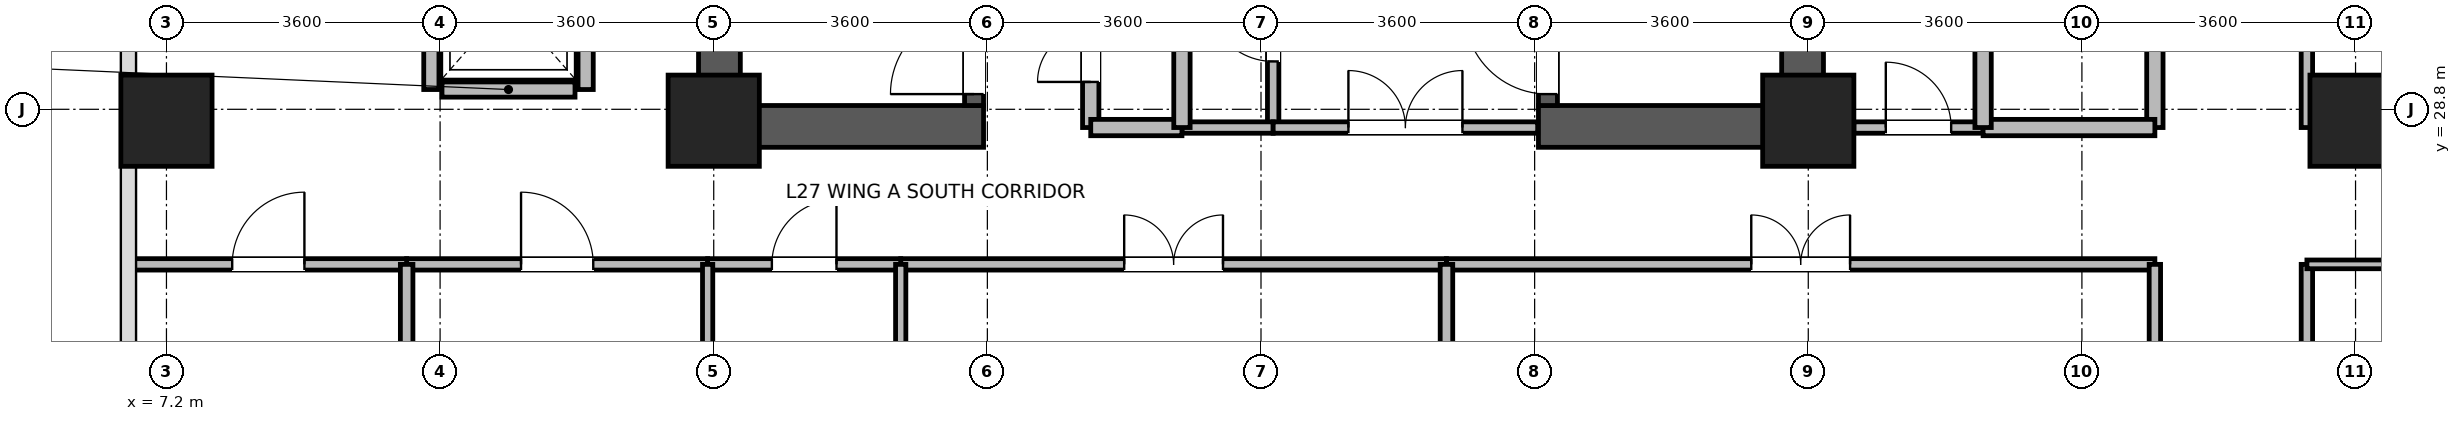
"""IFC4 building model, lengths in metres.
Left out: names, types, materials, properties, quantities, classifications, styles, units other than length and angle.
Written with IfcOpenShell. Run it as: python <this file> out.ifc"""

import sys

from ifc_helpers import new_model, si_unit, direction, frame, frame_2d, origin, origin_2d, place, context, subcontext, project, spatial, rectangle, extrude, source, transform, mapped, element, fill, save


model = new_model("IFC4")
c1 = context("Model", 3, precision=1e-05, world=origin(), true_north=direction((0.0, 1.0)))
c2 = subcontext(c1, "Body", "Model", "MODEL_VIEW")
j1 = project(units=[si_unit("LENGTHUNIT", "METRE"), si_unit("PLANEANGLEUNIT", "RADIAN")], contexts=[c1])
p1 = place(None, origin())
s1 = spatial("IfcSite", under=j1, at=p1, CompositionType="ELEMENT")
p2 = place(p1, origin())
s2 = spatial("IfcBuilding", under=s1, at=p2, CompositionType="ELEMENT")
p3 = place(p2, frame((0.0, 0.0, 108.2)))
s3 = spatial("IfcBuildingStorey", under=s2, at=p3, CompositionType="ELEMENT", Elevation=108.2)
for number, where, z_axis, x_axis in (
    (1, (14.475, 28.3, 0.0), (0.0, 0.0, 1.0), (0.0, 1.0, 0.0)),
    (2, (28.725, 28.3, 0.0), (0.0, 0.0, 1.0), (0.0, 1.0, 0.0)),
):
    element("IfcWall", number, at=place(p3, frame(where, z_axis=z_axis, x_axis=x_axis)), inside=s3, PredefinedType="SHEAR", context=c2, shape_type="SweptSolid", body=[
        extrude(rectangle(XDim=8.1, YDim=0.55, at=frame_2d((4.05, 0.0))), origin(), (0.0, 0.0, 1.0), 3.45),
    ])
for number, where, z_axis, x_axis in (
    (3, (14.75, 28.575, 0.0), (0.0, 0.0, 1.0), (1.0, 0.0, 0.0)),
    (4, (25.25, 28.575, 0.0), (0.0, 0.0, 1.0), (1.0, 0.0, 0.0)),
):
    element("IfcWall", number, at=place(p3, frame(where, z_axis=z_axis, x_axis=x_axis)), inside=s3, PredefinedType="SHEAR", context=c2, shape_type="SweptSolid", body=[
        extrude(rectangle(XDim=3.2, YDim=0.55, at=frame_2d((1.6, 0.0))), origin(), (0.0, 0.0, 1.0), 3.45),
    ])
p4 = place(p3, frame((17.825, 28.85, 0.0), z_axis=(0.0, 0.0, 1.0), x_axis=(0.0, 1.0, 0.0)))
e5 = element("IfcWall", 5, at=p4, inside=s3, PredefinedType="SHEAR", context=c2, shape_type="SweptSolid", body=[
    extrude(rectangle(XDim=7.0, YDim=0.25, at=frame_2d((3.5, 0.0))), origin(), (0.0, 0.0, 1.0), 3.45),
])
p5 = place(p4, frame((0.15, 0.0, 0.0)))
e6 = element("IfcOpeningElement", 6, at=p5, cuts=e5, PredefinedType="OPENING", context=c2, shape_type="SweptSolid", body=[
    extrude(rectangle(XDim=1.1, YDim=2.08, at=frame_2d((0.55, 1.04))), frame((0.0, 0.135, 0.0), z_axis=(0.0, -1.0, 0.0), x_axis=(1.0, 0.0, 0.0)), (0.0, 0.0, 1.0), 0.27),
])
p6 = place(p3, frame((25.375, 28.85, 0.0), z_axis=(0.0, 0.0, 1.0), x_axis=(0.0, 1.0, 0.0)))
e7 = element("IfcWall", 7, at=p6, inside=s3, PredefinedType="SHEAR", context=c2, shape_type="SweptSolid", body=[
    extrude(rectangle(XDim=7.0, YDim=0.25, at=frame_2d((3.5, 0.0))), origin(), (0.0, 0.0, 1.0), 3.45),
])
p7 = place(p6, frame((0.15, 0.0, 0.0)))
e8 = element("IfcOpeningElement", 8, at=p7, cuts=e7, PredefinedType="OPENING", context=c2, shape_type="SweptSolid", body=[
    extrude(rectangle(XDim=1.1, YDim=2.08, at=frame_2d((0.55, 1.04))), frame((0.0, 0.135, 0.0), z_axis=(0.0, -1.0, 0.0), x_axis=(1.0, 0.0, 0.0)), (0.0, 0.0, 1.0), 0.27),
])
m1 = source(origin(), c2, "Body", "SweptSolid", [
    extrude(rectangle(XDim=1.2, YDim=1.2, at=origin_2d()), origin(), (0.0, 0.0, 1.0), 3.7),
])
for number, where, z_axis, x_axis in (
    (9, (7.2, 28.65, 0.0), (0.0, 0.0, 1.0), (1.0, 0.0, 0.0)),
    (10, (14.4, 28.65, 0.0), (0.0, 0.0, 1.0), (1.0, 0.0, 0.0)),
    (11, (28.8, 28.65, 0.0), (0.0, 0.0, 1.0), (1.0, 0.0, 0.0)),
    (12, (36.0, 28.65, 0.0), (0.0, 0.0, 1.0), (1.0, 0.0, 0.0)),
):
    element("IfcColumn", number, at=place(p3, frame(where, z_axis=z_axis, x_axis=x_axis)), inside=s3, PredefinedType="COLUMN", context=c2, shape_type="MappedRepresentation", body=[
        mapped(m1, transform((0.0, 0.0, 0.0), x_axis=(1.0, 0.0, 0.0), y_axis=(0.0, 1.0, 0.0), z_axis=(0.0, 0.0, 1.0), scale=1.0)),
    ])
p8 = place(p3, frame((10.825, 29.06, 0.0), z_axis=(0.0, 0.0, 1.0), x_axis=(1.0, 0.0, 0.0)))
e13 = element("IfcWall", 13, at=p8, inside=s3, PredefinedType="PARTITIONING", context=c2, shape_type="SweptSolid", body=[
    extrude(rectangle(XDim=1.75, YDim=0.2, at=frame_2d((0.875, 0.0))), origin(), (0.0, 0.0, 1.0), 3.43),
])
for number, where, z_axis, x_axis in (
    (14, (10.685, 29.06, 0.0), (0.0, 0.0, 1.0), (0.0, 1.0, 0.0)),
    (15, (12.715, 29.06, 0.0), (0.0, 0.0, 1.0), (0.0, 1.0, 0.0)),
):
    element("IfcWall", number, at=place(p3, frame(where, z_axis=z_axis, x_axis=x_axis)), inside=s3, PredefinedType="PARTITIONING", context=c2, shape_type="SweptSolid", body=[
        extrude(rectangle(XDim=2.28, YDim=0.2, at=frame_2d((1.14, 0.0))), origin(), (0.0, 0.0, 1.0), 3.43),
    ])
p9 = place(p3, frame((35.36, 16.96, 0.0), z_axis=(0.0, 0.0, 1.0), x_axis=(0.0, 1.0, 0.0)))
e16 = element("IfcWall", 16, at=p9, inside=s3, PredefinedType="PARTITIONING", context=c2, shape_type="SweptSolid", body=[
    extrude(rectangle(XDim=9.8, YDim=0.15, at=frame_2d((4.9, 0.0))), origin(), (0.0, 0.0, 1.0), 3.43),
])
p10 = place(p9, frame((2.486, 0.0, 0.0)))
e17 = element("IfcOpeningElement", 17, at=p10, cuts=e16, PredefinedType="OPENING", context=c2, shape_type="SweptSolid", body=[
    extrude(rectangle(XDim=1.3, YDim=2.12, at=frame_2d((0.65, 1.06))), frame((0.0, 0.085, 0.0), z_axis=(0.0, -1.0, 0.0), x_axis=(1.0, 0.0, 0.0)), (0.0, 0.0, 1.0), 0.17),
])
p11 = place(p3, frame((24.04, 26.76, 0.0), z_axis=(0.0, 0.0, 1.0), x_axis=(1.0, 0.0, 0.0)))
e18 = element("IfcWall", 18, at=p11, inside=s3, PredefinedType="PARTITIONING", context=c2, shape_type="SweptSolid", body=[
    extrude(rectangle(XDim=9.32, YDim=0.15, at=frame_2d((4.66, 0.0))), origin(), (0.0, 0.0, 1.0), 3.43),
])
p12 = place(p11, frame((4.01, 0.0, 0.0)))
e19 = element("IfcOpeningElement", 19, at=p12, cuts=e18, PredefinedType="OPENING", context=c2, shape_type="SweptSolid", body=[
    extrude(rectangle(XDim=1.3, YDim=2.12, at=frame_2d((0.65, 1.06))), frame((0.0, 0.085, 0.0), z_axis=(0.0, -1.0, 0.0), x_axis=(1.0, 0.0, 0.0)), (0.0, 0.0, 1.0), 0.17),
])
p13 = place(p3, frame((35.36, 28.56, 0.0), z_axis=(0.0, 0.0, 1.0), x_axis=(0.0, 1.0, 0.0)))
e20 = element("IfcWall", 20, at=p13, inside=s3, PredefinedType="PARTITIONING", context=c2, shape_type="SweptSolid", body=[
    extrude(rectangle(XDim=7.68, YDim=0.15, at=frame_2d((3.84, 0.0))), origin(), (0.0, 0.0, 1.0), 3.43),
])
p14 = place(p13, frame((3.19, 0.0, 0.0)))
e21 = element("IfcOpeningElement", 21, at=p14, cuts=e20, PredefinedType="OPENING", context=c2, shape_type="SweptSolid", body=[
    extrude(rectangle(XDim=1.3, YDim=2.12, at=frame_2d((0.65, 1.06))), frame((0.0, 0.085, 0.0), z_axis=(0.0, -1.0, 0.0), x_axis=(1.0, 0.0, 0.0)), (0.0, 0.0, 1.0), 0.17),
])
p15 = place(p3, frame((16.86, 26.76, 0.0), z_axis=(0.0, 0.0, 1.0), x_axis=(1.0, 0.0, 0.0)))
e22 = element("IfcWall", 22, at=p15, inside=s3, PredefinedType="PARTITIONING", context=c2, shape_type="SweptSolid", body=[
    extrude(rectangle(XDim=7.18, YDim=0.15, at=frame_2d((3.59, 0.0))), origin(), (0.0, 0.0, 1.0), 3.43),
])
p16 = place(p15, frame((2.94, 0.0, 0.0)))
e23 = element("IfcOpeningElement", 23, at=p16, cuts=e22, PredefinedType="OPENING", context=c2, shape_type="SweptSolid", body=[
    extrude(rectangle(XDim=1.3, YDim=2.12, at=frame_2d((0.65, 1.06))), frame((0.0, 0.085, 0.0), z_axis=(0.0, -1.0, 0.0), x_axis=(1.0, 0.0, 0.0)), (0.0, 0.0, 1.0), 0.17),
])
p17 = place(p3, frame((33.36, 21.6, 0.0), z_axis=(0.0, 0.0, 1.0), x_axis=(0.0, 1.0, 0.0)))
e24 = element("IfcWall", 24, at=p17, inside=s3, PredefinedType="PARTITIONING", context=c2, shape_type="SweptSolid", body=[
    extrude(rectangle(XDim=5.16, YDim=0.15, at=frame_2d((2.58, 0.0))), origin(), (0.0, 0.0, 1.0), 3.43),
])
p18 = place(p3, frame((10.36, 26.76, 0.0), z_axis=(0.0, 0.0, 1.0), x_axis=(1.0, 0.0, 0.0)))
e25 = element("IfcWall", 25, at=p18, inside=s3, PredefinedType="PARTITIONING", context=c2, shape_type="SweptSolid", body=[
    extrude(rectangle(XDim=3.96, YDim=0.15, at=frame_2d((1.98, 0.0))), origin(), (0.0, 0.0, 1.0), 3.43),
])
p19 = place(p18, frame((1.505, 0.0, 0.0)))
e26 = element("IfcOpeningElement", 26, at=p19, cuts=e25, PredefinedType="OPENING", context=c2, shape_type="SweptSolid", body=[
    extrude(rectangle(XDim=0.95, YDim=2.1, at=frame_2d((0.475, 1.05))), frame((0.0, 0.085, 0.0), z_axis=(0.0, -1.0, 0.0), x_axis=(1.0, 0.0, 0.0)), (0.0, 0.0, 1.0), 0.17),
])
p20 = place(p3, frame((33.36, 28.56, 0.0), z_axis=(0.0, 0.0, 1.0), x_axis=(0.0, 1.0, 0.0)))
e27 = element("IfcWall", 27, at=p20, inside=s3, PredefinedType="PARTITIONING", context=c2, shape_type="SweptSolid", body=[
    extrude(rectangle(XDim=3.84, YDim=0.215, at=frame_2d((1.92, 0.0))), origin(), (0.0, 0.0, 1.0), 3.43),
])
p21 = place(p20, frame((1.22, 0.0, 0.0)))
e28 = element("IfcOpeningElement", 28, at=p21, cuts=e27, PredefinedType="OPENING", context=c2, shape_type="SweptSolid", body=[
    extrude(rectangle(XDim=1.4, YDim=2.15, at=frame_2d((0.7, 1.075))), frame((0.0, 0.118, 0.0), z_axis=(0.0, -1.0, 0.0), x_axis=(1.0, 0.0, 0.0)), (0.0, 0.0, 1.0), 0.235),
])
p22 = place(p3, frame((6.72, 26.76, 0.0), z_axis=(0.0, 0.0, 1.0), x_axis=(1.0, 0.0, 0.0)))
e29 = element("IfcWall", 29, at=p22, inside=s3, PredefinedType="PARTITIONING", context=c2, shape_type="SweptSolid", body=[
    extrude(rectangle(XDim=3.64, YDim=0.15, at=frame_2d((1.82, 0.0))), origin(), (0.0, 0.0, 1.0), 3.43),
])
p23 = place(p22, frame((1.345, 0.0, 0.0)))
e30 = element("IfcOpeningElement", 30, at=p23, cuts=e29, PredefinedType="OPENING", context=c2, shape_type="SweptSolid", body=[
    extrude(rectangle(XDim=0.95, YDim=2.1, at=frame_2d((0.475, 1.05))), frame((0.0, 0.085, 0.0), z_axis=(0.0, -1.0, 0.0), x_axis=(1.0, 0.0, 0.0)), (0.0, 0.0, 1.0), 0.17),
])
p24 = place(p3, frame((19.36, 28.56, 0.0), z_axis=(0.0, 0.0, 1.0), x_axis=(0.0, 1.0, 0.0)))
e31 = element("IfcWall", 31, at=p24, inside=s3, PredefinedType="PARTITIONING", context=c2, shape_type="SweptSolid", body=[
    extrude(rectangle(XDim=2.6, YDim=0.215, at=frame_2d((1.3, 0.0))), origin(), (0.0, 0.0, 1.0), 3.43),
])
p25 = place(p24, frame((0.6, 0.0, 0.0)))
e32 = element("IfcOpeningElement", 32, at=p25, cuts=e31, PredefinedType="OPENING", context=c2, shape_type="SweptSolid", body=[
    extrude(rectangle(XDim=1.4, YDim=2.15, at=frame_2d((0.7, 1.075))), frame((0.0, 0.118, 0.0), z_axis=(0.0, -1.0, 0.0), x_axis=(1.0, 0.0, 0.0)), (0.0, 0.0, 1.0), 0.235),
])
p26 = place(p3, frame((21.76, 28.56, 0.0), z_axis=(0.0, 0.0, 1.0), x_axis=(0.0, 1.0, 0.0)))
e33 = element("IfcWall", 33, at=p26, inside=s3, PredefinedType="PARTITIONING", context=c2, shape_type="SweptSolid", body=[
    extrude(rectangle(XDim=2.6, YDim=0.15, at=frame_2d((1.3, 0.0))), origin(), (0.0, 0.0, 1.0), 3.43),
])
p27 = place(p26, frame((0.87, 0.0, 0.0)))
e34 = element("IfcOpeningElement", 34, at=p27, cuts=e33, PredefinedType="OPENING", context=c2, shape_type="SweptSolid", body=[
    extrude(rectangle(XDim=0.86, YDim=2.02, at=frame_2d((0.43, 1.01))), frame((0.0, 0.085, 0.0), z_axis=(0.0, -1.0, 0.0), x_axis=(1.0, 0.0, 0.0)), (0.0, 0.0, 1.0), 0.17),
])
p28 = place(p3, frame((14.32, 26.76, 0.0), z_axis=(0.0, 0.0, 1.0), x_axis=(1.0, 0.0, 0.0)))
e35 = element("IfcWall", 35, at=p28, inside=s3, PredefinedType="PARTITIONING", context=c2, shape_type="SweptSolid", body=[
    extrude(rectangle(XDim=2.54, YDim=0.15, at=frame_2d((1.27, 0.0))), origin(), (0.0, 0.0, 1.0), 3.43),
])
p29 = place(p28, frame((0.845, 0.0, 0.0)))
e36 = element("IfcOpeningElement", 36, at=p29, cuts=e35, PredefinedType="OPENING", context=c2, shape_type="SweptSolid", body=[
    extrude(rectangle(XDim=0.85, YDim=2.04, at=frame_2d((0.425, 1.02))), frame((0.0, 0.085, 0.0), z_axis=(0.0, -1.0, 0.0), x_axis=(1.0, 0.0, 0.0)), (0.0, 0.0, 1.0), 0.17),
])
p30 = place(p3, frame((29.4, 28.56, 0.0), z_axis=(0.0, 0.0, 1.0), x_axis=(1.0, 0.0, 0.0)))
e37 = element("IfcWall", 37, at=p30, inside=s3, PredefinedType="PARTITIONING", context=c2, shape_type="SweptSolid", body=[
    extrude(rectangle(XDim=1.7, YDim=0.15, at=frame_2d((0.85, 0.0))), origin(), (0.0, 0.0, 1.0), 2.78),
])
p31 = place(p30, frame((0.42, 0.0, 0.0)))
e38 = element("IfcOpeningElement", 38, at=p31, cuts=e37, PredefinedType="OPENING", context=c2, shape_type="SweptSolid", body=[
    extrude(rectangle(XDim=0.86, YDim=2.02, at=frame_2d((0.43, 1.01))), frame((0.0, 0.085, 0.0), z_axis=(0.0, -1.0, 0.0), x_axis=(1.0, 0.0, 0.0)), (0.0, 0.0, 1.0), 0.17),
])
p32 = place(p3, frame((31.1, 28.56, 0.0), z_axis=(0.0, 0.0, 1.0), x_axis=(1.0, 0.0, 0.0)))
e39 = element("IfcWall", 39, at=p32, inside=s3, PredefinedType="PARTITIONING", context=c2, shape_type="SweptSolid", body=[
    extrude(rectangle(XDim=2.26, YDim=0.215, at=frame_2d((1.13, 0.0))), origin(), (0.0, 0.0, 1.0), 2.78),
])
p33 = place(p3, frame((20.56, 28.56, 0.0), z_axis=(0.0, 0.0, 1.0), x_axis=(1.0, 0.0, 0.0)))
e40 = element("IfcWall", 40, at=p33, inside=s3, PredefinedType="PARTITIONING", context=c2, shape_type="SweptSolid", body=[
    extrude(rectangle(XDim=1.2, YDim=0.15, at=frame_2d((0.6, 0.0))), origin(), (0.0, 0.0, 1.0), 2.43),
])
p34 = place(p3, frame((19.36, 28.56, 0.0), z_axis=(0.0, 0.0, 1.0), x_axis=(1.0, 0.0, 0.0)))
e41 = element("IfcWall", 41, at=p34, inside=s3, PredefinedType="PARTITIONING", context=c2, shape_type="SweptSolid", body=[
    extrude(rectangle(XDim=1.2, YDim=0.215, at=frame_2d((0.6, 0.0))), origin(), (0.0, 0.0, 1.0), 2.43),
])
p35 = place(p3, frame((35.36, 26.76, 0.0), z_axis=(0.0, 0.0, 1.0), x_axis=(1.0, 0.0, 0.0)))
e42 = element("IfcWall", 42, at=p35, inside=s3, PredefinedType="PARTITIONING", context=c2, shape_type="SweptSolid", body=[
    extrude(rectangle(XDim=7.84, YDim=0.115, at=frame_2d((3.92, 0.0))), origin(), (0.0, 0.0, 1.0), 3.43),
])
p36 = place(p3, frame((10.36, 21.732, 0.0), z_axis=(0.0, 0.0, 1.0), x_axis=(0.0, 1.0, 0.0)))
e43 = element("IfcWall", 43, at=p36, inside=s3, PredefinedType="PARTITIONING", context=c2, shape_type="SweptSolid", body=[
    extrude(rectangle(XDim=5.028, YDim=0.165, at=frame_2d((2.514, 0.0))), origin(), (0.0, 0.0, 1.0), 3.43),
])
p37 = place(p3, frame((14.32, 21.732, 0.0), z_axis=(0.0, 0.0, 1.0), x_axis=(0.0, 1.0, 0.0)))
e44 = element("IfcWall", 44, at=p37, inside=s3, PredefinedType="PARTITIONING", context=c2, shape_type="SweptSolid", body=[
    extrude(rectangle(XDim=5.028, YDim=0.135, at=frame_2d((2.514, 0.0))), origin(), (0.0, 0.0, 1.0), 2.93),
])
p38 = place(p3, frame((16.86, 21.732, 0.0), z_axis=(0.0, 0.0, 1.0), x_axis=(0.0, 1.0, 0.0)))
e45 = element("IfcWall", 45, at=p38, inside=s3, PredefinedType="PARTITIONING", context=c2, shape_type="SweptSolid", body=[
    extrude(rectangle(XDim=5.028, YDim=0.135, at=frame_2d((2.514, 0.0))), origin(), (0.0, 0.0, 1.0), 3.43),
])
p39 = place(p3, frame((24.04, 21.732, 0.0), z_axis=(0.0, 0.0, 1.0), x_axis=(0.0, 1.0, 0.0)))
e46 = element("IfcWall", 46, at=p39, inside=s3, PredefinedType="PARTITIONING", context=c2, shape_type="SweptSolid", body=[
    extrude(rectangle(XDim=5.028, YDim=0.165, at=frame_2d((2.514, 0.0))), origin(), (0.0, 0.0, 1.0), 3.43),
])
p40 = place(p3, frame((31.1, 28.56, 0.0), z_axis=(0.0, 0.0, 1.0), x_axis=(0.0, 1.0, 0.0)))
e47 = element("IfcWall", 47, at=p40, inside=s3, PredefinedType="PARTITIONING", context=c2, shape_type="SweptSolid", body=[
    extrude(rectangle(XDim=3.84, YDim=0.215, at=frame_2d((1.92, 0.0))), origin(), (0.0, 0.0, 1.0), 3.43),
])
p41 = place(p3, frame((21.76, 28.56, 0.0), z_axis=(0.0, 0.0, 1.0), x_axis=(1.0, 0.0, 0.0)))
e48 = element("IfcWall", 48, at=p41, inside=s3, PredefinedType="PARTITIONING", context=c2, shape_type="SweptSolid", body=[
    extrude(rectangle(XDim=3.48, YDim=0.15, at=frame_2d((1.74, 0.0))), origin(), (0.0, 0.0, 1.0), 2.43),
])
p42 = place(p41, frame((0.99, 0.0, 0.0)))
e49 = element("IfcOpeningElement", 49, at=p42, cuts=e48, PredefinedType="OPENING", context=c2, shape_type="SweptSolid", body=[
    extrude(rectangle(XDim=1.5, YDim=2.1, at=frame_2d((0.75, 1.05))), frame((0.0, 0.085, 0.0), z_axis=(0.0, -1.0, 0.0), x_axis=(1.0, 0.0, 0.0)), (0.0, 0.0, 1.0), 0.17),
])
p43 = place(p3, frame((20.56, 28.56, 0.0), z_axis=(0.0, 0.0, 1.0), x_axis=(0.0, 1.0, 0.0)))
e50 = element("IfcWall", 50, at=p43, inside=s3, PredefinedType="PARTITIONING", context=c2, shape_type="SweptSolid", body=[
    extrude(rectangle(XDim=2.6, YDim=0.215, at=frame_2d((1.3, 0.0))), origin(), (0.0, 0.0, 1.0), 3.43),
])
p44 = place(p5, origin())
e51 = element("IfcDoor", 51, at=p44, inside=s3, OperationType="SINGLE_SWING_LEFT", PredefinedType="DOOR", context=c2, shape_type="SweptSolid", body=[
    extrude(rectangle(XDim=1.1, YDim=2.08, at=frame_2d((0.55, 1.04))), frame((0.0, 0.025, 0.0), z_axis=(0.0, -1.0, 0.0), x_axis=(1.0, 0.0, 0.0)), (0.0, 0.0, 1.0), 0.05),
])
fill(e6, e51)
p45 = place(p7, origin())
e52 = element("IfcDoor", 52, at=p45, inside=s3, OperationType="SINGLE_SWING_RIGHT", PredefinedType="DOOR", context=c2, shape_type="SweptSolid", body=[
    extrude(rectangle(XDim=1.1, YDim=2.08, at=frame_2d((0.55, 1.04))), frame((0.0, 0.025, 0.0), z_axis=(0.0, -1.0, 0.0), x_axis=(1.0, 0.0, 0.0)), (0.0, 0.0, 1.0), 0.05),
])
fill(e8, e52)
p46 = place(p12, origin())
e53 = element("IfcDoor", 53, at=p46, inside=s3, OperationType="DOUBLE_DOOR_SINGLE_SWING", PredefinedType="DOOR", context=c2, shape_type="SweptSolid", body=[
    extrude(rectangle(XDim=1.3, YDim=2.12, at=frame_2d((0.65, 1.06))), frame((0.0, 0.025, 0.0), z_axis=(0.0, -1.0, 0.0), x_axis=(1.0, 0.0, 0.0)), (0.0, 0.0, 1.0), 0.05),
])
fill(e19, e53)
p47 = place(p16, origin())
e54 = element("IfcDoor", 54, at=p47, inside=s3, OperationType="DOUBLE_DOOR_SINGLE_SWING", PredefinedType="DOOR", context=c2, shape_type="SweptSolid", body=[
    extrude(rectangle(XDim=1.3, YDim=2.12, at=frame_2d((0.65, 1.06))), frame((0.0, 0.025, 0.0), z_axis=(0.0, -1.0, 0.0), x_axis=(1.0, 0.0, 0.0)), (0.0, 0.0, 1.0), 0.05),
])
fill(e23, e54)
p48 = place(p19, origin())
e55 = element("IfcDoor", 55, at=p48, inside=s3, OperationType="SINGLE_SWING_LEFT", PredefinedType="DOOR", context=c2, shape_type="SweptSolid", body=[
    extrude(rectangle(XDim=0.95, YDim=2.1, at=frame_2d((0.475, 1.05))), frame((0.0, 0.025, 0.0), z_axis=(0.0, -1.0, 0.0), x_axis=(1.0, 0.0, 0.0)), (0.0, 0.0, 1.0), 0.05),
])
fill(e26, e55)
p49 = place(p23, origin())
e56 = element("IfcDoor", 56, at=p49, inside=s3, OperationType="SINGLE_SWING_RIGHT", PredefinedType="DOOR", context=c2, shape_type="SweptSolid", body=[
    extrude(rectangle(XDim=0.95, YDim=2.1, at=frame_2d((0.475, 1.05))), frame((0.0, 0.025, 0.0), z_axis=(0.0, -1.0, 0.0), x_axis=(1.0, 0.0, 0.0)), (0.0, 0.0, 1.0), 0.05),
])
fill(e30, e56)
p50 = place(p25, origin())
e57 = element("IfcDoor", 57, at=p50, inside=s3, OperationType="DOUBLE_DOOR_SINGLE_SWING", PredefinedType="DOOR", context=c2, shape_type="SweptSolid", body=[
    extrude(rectangle(XDim=1.4, YDim=2.15, at=frame_2d((0.7, 1.075))), frame((0.0, 0.025, 0.0), z_axis=(0.0, -1.0, 0.0), x_axis=(1.0, 0.0, 0.0)), (0.0, 0.0, 1.0), 0.05),
])
fill(e32, e57)
p51 = place(p27, origin())
e58 = element("IfcDoor", 58, at=p51, inside=s3, OperationType="SINGLE_SWING_RIGHT", PredefinedType="DOOR", context=c2, shape_type="SweptSolid", body=[
    extrude(rectangle(XDim=0.86, YDim=2.02, at=frame_2d((0.43, 1.01))), frame((0.0, 0.025, 0.0), z_axis=(0.0, -1.0, 0.0), x_axis=(1.0, 0.0, 0.0)), (0.0, 0.0, 1.0), 0.05),
])
fill(e34, e58)
p52 = place(p29, origin())
e59 = element("IfcDoor", 59, at=p52, inside=s3, OperationType="SINGLE_SWING_RIGHT", PredefinedType="DOOR", context=c2, shape_type="SweptSolid", body=[
    extrude(rectangle(XDim=0.85, YDim=2.04, at=frame_2d((0.425, 1.02))), frame((0.0, 0.025, 0.0), z_axis=(0.0, -1.0, 0.0), x_axis=(1.0, 0.0, 0.0)), (0.0, 0.0, 1.0), 0.05),
])
fill(e36, e59)
p53 = place(p31, origin())
e60 = element("IfcDoor", 60, at=p53, inside=s3, OperationType="SINGLE_SWING_LEFT", PredefinedType="DOOR", context=c2, shape_type="SweptSolid", body=[
    extrude(rectangle(XDim=0.86, YDim=2.02, at=frame_2d((0.43, 1.01))), frame((0.0, 0.025, 0.0), z_axis=(0.0, -1.0, 0.0), x_axis=(1.0, 0.0, 0.0)), (0.0, 0.0, 1.0), 0.05),
])
fill(e38, e60)
p54 = place(p42, origin())
e61 = element("IfcDoor", 61, at=p54, inside=s3, OperationType="DOUBLE_DOOR_SINGLE_SWING", PredefinedType="DOOR", context=c2, shape_type="SweptSolid", body=[
    extrude(rectangle(XDim=1.5, YDim=2.1, at=frame_2d((0.75, 1.05))), frame((0.0, 0.025, 0.0), z_axis=(0.0, -1.0, 0.0), x_axis=(1.0, 0.0, 0.0)), (0.0, 0.0, 1.0), 0.05),
])
fill(e49, e61)
save(model, sys.argv[1])
